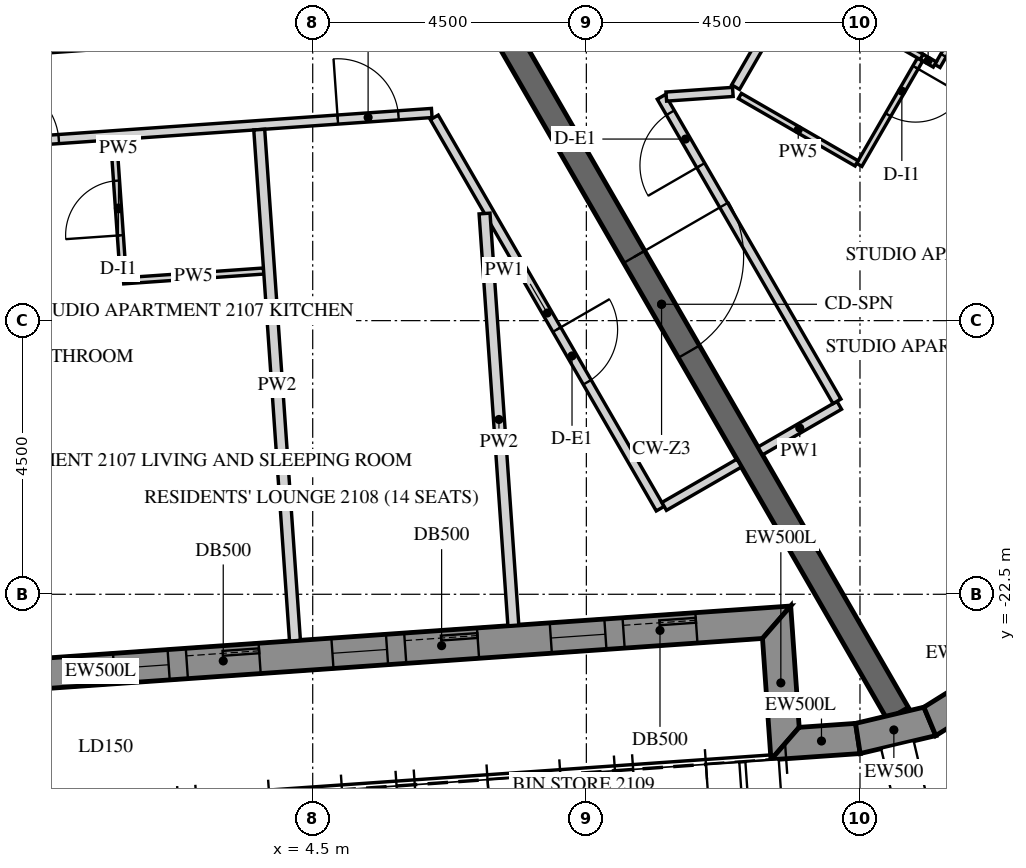
"""IFC4 building model, lengths in metres.
Left out: names, types, materials, properties, quantities, classifications, styles, units other than length and angle.
Written with IfcOpenShell. Run it as: python <this file> out.ifc"""

import sys

from ifc_helpers import new_model, si_unit, direction, frame, frame_2d, origin, place, context, subcontext, project, spatial, polyline, rectangle, outline, extrude, element, fill, save


model = new_model("IFC4")
c1 = context("Model", 3, precision=1e-05, world=origin(), true_north=direction((0.0, 1.0)))
c2 = subcontext(c1, "Body", "Model", "MODEL_VIEW")
j1 = project(units=[si_unit("LENGTHUNIT", "METRE"), si_unit("PLANEANGLEUNIT", "RADIAN")], contexts=[c1])
p1 = place(None, origin())
s1 = spatial("IfcSite", under=j1, at=p1, CompositionType="ELEMENT")
p2 = place(p1, origin())
s2 = spatial("IfcBuilding", under=s1, at=p2, CompositionType="ELEMENT")
p3 = place(p2, frame((0.0, 0.0, 267.9)))
s3 = spatial("IfcBuildingStorey", under=s2, at=p3, CompositionType="ELEMENT", Elevation=267.9)
p4 = place(p3, frame((-10.86, -24.567, -0.15), z_axis=(0.0, 0.0, 1.0), x_axis=(0.997564329317, 0.06975248292, 0.0)))
e1 = element("IfcWall", 1, at=p4, inside=s3, PredefinedType="SOLIDWALL", context=c2, shape_type="SweptSolid", body=[
    extrude(outline(polyline([(0.25, -0.25), (22.795, -0.25), (23.295, 0.25), (-0.25, 0.25), (0.25, -0.25)])), origin(), (0.0, 0.0, 1.0), 3.9),
])
p5 = place(p4, frame((1.323, 0.0, 1.05)))
e2 = element("IfcOpeningElement", 2, at=p5, cuts=e1, PredefinedType="OPENING", context=c2, shape_type="SweptSolid", body=[
    extrude(rectangle(XDim=0.9, YDim=1.5, at=frame_2d((0.45, 0.75))), frame((0.0, 0.26, 0.0), z_axis=(0.0, -1.0, 0.0), x_axis=(1.0, 0.0, 0.0)), (0.0, 0.0, 1.0), 0.52),
])
p6 = place(p4, frame((2.522, 0.0, 0.15)))
e3 = element("IfcOpeningElement", 3, at=p6, cuts=e1, PredefinedType="OPENING", context=c2, shape_type="SweptSolid", body=[
    extrude(rectangle(XDim=1.2, YDim=2.4, at=frame_2d((0.6, 1.2))), frame((0.0, 0.26, 0.0), z_axis=(0.0, -1.0, 0.0), x_axis=(1.0, 0.0, 0.0)), (0.0, 0.0, 1.0), 0.52),
])
p7 = place(p4, frame((4.922, 0.0, 1.05)))
e4 = element("IfcOpeningElement", 4, at=p7, cuts=e1, PredefinedType="OPENING", context=c2, shape_type="SweptSolid", body=[
    extrude(rectangle(XDim=0.9, YDim=1.5, at=frame_2d((0.45, 0.75))), frame((0.0, 0.26, 0.0), z_axis=(0.0, -1.0, 0.0), x_axis=(1.0, 0.0, 0.0)), (0.0, 0.0, 1.0), 0.52),
])
p8 = place(p4, frame((6.122, 0.0, 0.15)))
e5 = element("IfcOpeningElement", 5, at=p8, cuts=e1, PredefinedType="OPENING", context=c2, shape_type="SweptSolid", body=[
    extrude(rectangle(XDim=1.2, YDim=2.4, at=frame_2d((0.6, 1.2))), frame((0.0, 0.26, 0.0), z_axis=(0.0, -1.0, 0.0), x_axis=(1.0, 0.0, 0.0)), (0.0, 0.0, 1.0), 0.52),
])
p9 = place(p4, frame((8.522, 0.0, 1.05)))
e6 = element("IfcOpeningElement", 6, at=p9, cuts=e1, PredefinedType="OPENING", context=c2, shape_type="SweptSolid", body=[
    extrude(rectangle(XDim=0.9, YDim=1.5, at=frame_2d((0.45, 0.75))), frame((0.0, 0.26, 0.0), z_axis=(0.0, -1.0, 0.0), x_axis=(1.0, 0.0, 0.0)), (0.0, 0.0, 1.0), 0.52),
])
p10 = place(p4, frame((9.722, 0.0, 0.15)))
e7 = element("IfcOpeningElement", 7, at=p10, cuts=e1, PredefinedType="OPENING", context=c2, shape_type="SweptSolid", body=[
    extrude(rectangle(XDim=1.2, YDim=2.4, at=frame_2d((0.6, 1.2))), frame((0.0, 0.26, 0.0), z_axis=(0.0, -1.0, 0.0), x_axis=(1.0, 0.0, 0.0)), (0.0, 0.0, 1.0), 0.52),
])
p11 = place(p4, frame((12.122, 0.0, 1.05)))
e8 = element("IfcOpeningElement", 8, at=p11, cuts=e1, PredefinedType="OPENING", context=c2, shape_type="SweptSolid", body=[
    extrude(rectangle(XDim=0.9, YDim=1.5, at=frame_2d((0.45, 0.75))), frame((0.0, 0.26, 0.0), z_axis=(0.0, -1.0, 0.0), x_axis=(1.0, 0.0, 0.0)), (0.0, 0.0, 1.0), 0.52),
])
p12 = place(p4, frame((13.323, 0.0, 0.15)))
e9 = element("IfcOpeningElement", 9, at=p12, cuts=e1, PredefinedType="OPENING", context=c2, shape_type="SweptSolid", body=[
    extrude(rectangle(XDim=1.2, YDim=2.4, at=frame_2d((0.6, 1.2))), frame((0.0, 0.26, 0.0), z_axis=(0.0, -1.0, 0.0), x_axis=(1.0, 0.0, 0.0)), (0.0, 0.0, 1.0), 0.52),
])
p13 = place(p4, frame((15.722, 0.0, 1.05)))
e10 = element("IfcOpeningElement", 10, at=p13, cuts=e1, PredefinedType="OPENING", context=c2, shape_type="SweptSolid", body=[
    extrude(rectangle(XDim=0.9, YDim=1.5, at=frame_2d((0.45, 0.75))), frame((0.0, 0.26, 0.0), z_axis=(0.0, -1.0, 0.0), x_axis=(1.0, 0.0, 0.0)), (0.0, 0.0, 1.0), 0.52),
])
p14 = place(p4, frame((16.922, 0.0, 0.15)))
e11 = element("IfcOpeningElement", 11, at=p14, cuts=e1, PredefinedType="OPENING", context=c2, shape_type="SweptSolid", body=[
    extrude(rectangle(XDim=1.2, YDim=2.4, at=frame_2d((0.6, 1.2))), frame((0.0, 0.26, 0.0), z_axis=(0.0, -1.0, 0.0), x_axis=(1.0, 0.0, 0.0)), (0.0, 0.0, 1.0), 0.52),
])
p15 = place(p4, frame((19.323, 0.0, 1.05)))
e12 = element("IfcOpeningElement", 12, at=p15, cuts=e1, PredefinedType="OPENING", context=c2, shape_type="SweptSolid", body=[
    extrude(rectangle(XDim=0.9, YDim=1.5, at=frame_2d((0.45, 0.75))), frame((0.0, 0.26, 0.0), z_axis=(0.0, -1.0, 0.0), x_axis=(1.0, 0.0, 0.0)), (0.0, 0.0, 1.0), 0.52),
])
p16 = place(p4, frame((20.522, 0.0, 0.15)))
e13 = element("IfcOpeningElement", 13, at=p16, cuts=e1, PredefinedType="OPENING", context=c2, shape_type="SweptSolid", body=[
    extrude(rectangle(XDim=1.2, YDim=2.4, at=frame_2d((0.6, 1.2))), frame((0.0, 0.26, 0.0), z_axis=(0.0, -1.0, 0.0), x_axis=(1.0, 0.0, 0.0)), (0.0, 0.0, 1.0), 0.52),
])
p17 = place(p3, frame((12.129, -22.96, -0.15), z_axis=(0.0, 0.0, 1.0), x_axis=(0.069824268692, -0.99755930726, 0.0)))
e14 = element("IfcWall", 14, at=p17, inside=s3, PredefinedType="SOLIDWALL", context=c2, shape_type="SweptSolid", body=[
    extrude(outline(polyline([(0.25, -0.25), (2.25, -0.25), (1.75, 0.25), (-0.25, 0.25), (0.25, -0.25)])), origin(), (0.0, 0.0, 1.0), 3.9),
])
p18 = place(p3, frame((12.268, -24.955, -0.15), z_axis=(0.0, 0.0, 1.0), x_axis=(0.997561942506, 0.06978660948, 0.0)))
e15 = element("IfcWall", 15, at=p18, inside=s3, PredefinedType="SOLIDWALL", context=c2, shape_type="SweptSolid", body=[
    extrude(outline(polyline([(-0.25, -0.25), (1.22, -0.25), (1.179, 0.25), (0.25, 0.25), (-0.25, -0.25)])), origin(), (0.0, 0.0, 1.0), 3.9),
])
p19 = place(p3, frame((13.465, -24.871, -0.15), z_axis=(0.0, 0.0, 1.0), x_axis=(0.973044740285, 0.230616420501, 0.0)))
e16 = element("IfcWall", 16, at=p19, inside=s3, PredefinedType="SOLIDWALL", context=c2, shape_type="SweptSolid", body=[
    extrude(outline(polyline([(-0.021, -0.25), (1.257, -0.25), (1.175, 0.25), (0.021, 0.25), (-0.021, -0.25)])), origin(), (0.0, 0.0, 1.0), 3.9),
])
p20 = place(p3, frame((14.649, -24.591, -0.15), z_axis=(0.0, 0.0, 1.0), x_axis=(0.848054682072, 0.529908724419, 0.0)))
e17 = element("IfcWall", 17, at=p20, inside=s3, PredefinedType="SOLIDWALL", context=c2, shape_type="SweptSolid", body=[
    extrude(outline(polyline([(-0.041, -0.25), (1.257, -0.25), (1.175, 0.25), (0.041, 0.25), (-0.041, -0.25)])), origin(), (0.0, 0.0, 1.0), 3.9),
])
p21 = place(p3, frame((6.351, -11.0, -0.15), z_axis=(0.0, 0.0, 1.0), x_axis=(0.499998894578, -0.866026041999, 0.0)))
e18 = element("IfcWall", 18, at=p21, inside=s3, PredefinedType="SHEAR", context=c2, shape_type="SweptSolid", body=[
    extrude(rectangle(XDim=15.544, YDim=0.4, at=frame_2d((7.772, 0.0))), origin(), (0.0, 0.0, 1.0), 3.9),
])
p22 = place(p21, frame((6.872, 0.0, 0.15)))
e19 = element("IfcOpeningElement", 19, at=p22, cuts=e18, PredefinedType="OPENING", context=c2, shape_type="SweptSolid", body=[
    extrude(rectangle(XDim=1.8, YDim=2.4, at=frame_2d((0.9, 1.2))), frame((0.0, 0.21, 0.0), z_axis=(0.0, -1.0, 0.0), x_axis=(1.0, 0.0, 0.0)), (0.0, 0.0, 1.0), 0.42),
])
p23 = place(p3, frame((-10.44, -15.767, 0.0), z_axis=(0.0, 0.0, 1.0), x_axis=(0.997565037323, 0.069742356651, 0.0)))
e20 = element("IfcWall", 20, at=p23, inside=s3, PredefinedType="PARTITIONING", context=c2, shape_type="SweptSolid", body=[
    extrude(rectangle(XDim=16.939, YDim=0.15, at=frame_2d((8.47, 0.0))), origin(), (0.0, 0.0, 1.0), 2.988),
])
p24 = place(p23, frame((9.79, 0.0, 0.0)))
e21 = element("IfcOpeningElement", 21, at=p24, cuts=e20, PredefinedType="OPENING", context=c2, shape_type="SweptSolid", body=[
    extrude(rectangle(XDim=1.0, YDim=2.1, at=frame_2d((0.5, 1.05))), frame((0.0, 0.085, 0.0), z_axis=(0.0, -1.0, 0.0), x_axis=(1.0, 0.0, 0.0)), (0.0, 0.0, 1.0), 0.17),
])
p25 = place(p23, frame((15.39, 0.0, 0.0)))
e22 = element("IfcOpeningElement", 22, at=p25, cuts=e20, PredefinedType="OPENING", context=c2, shape_type="SweptSolid", body=[
    extrude(rectangle(XDim=1.0, YDim=2.1, at=frame_2d((0.5, 1.05))), frame((0.0, 0.085, 0.0), z_axis=(0.0, -1.0, 0.0), x_axis=(1.0, 0.0, 0.0)), (0.0, 0.0, 1.0), 0.17),
])
p26 = place(p3, frame((6.5, -14.657, 0.0), z_axis=(0.0, 0.0, 1.0), x_axis=(0.499966098742, -0.8660449758, 0.0)))
e23 = element("IfcWall", 23, at=p26, inside=s3, PredefinedType="PARTITIONING", context=c2, shape_type="SweptSolid", body=[
    extrude(rectangle(XDim=7.431, YDim=0.15, at=frame_2d((3.715, 0.0))), origin(), (0.0, 0.0, 1.0), 2.988),
])
p27 = place(p26, frame((4.03, 0.0, 0.0)))
e24 = element("IfcOpeningElement", 24, at=p27, cuts=e23, PredefinedType="OPENING", context=c2, shape_type="SweptSolid", body=[
    extrude(rectangle(XDim=1.0, YDim=2.1, at=frame_2d((0.5, 1.05))), frame((0.0, 0.085, 0.0), z_axis=(0.0, -1.0, 0.0), x_axis=(1.0, 0.0, 0.0)), (0.0, 0.0, 1.0), 0.17),
])
p28 = place(p3, frame((10.28, -21.055, 0.0), z_axis=(0.0, 0.0, 1.0), x_axis=(0.866020080793, 0.500009219579, 0.0)))
e25 = element("IfcWall", 25, at=p28, inside=s3, PredefinedType="PARTITIONING", context=c2, shape_type="SweptSolid", body=[
    extrude(rectangle(XDim=1.425, YDim=0.15, at=frame_2d((0.712, 0.0))), origin(), (0.0, 0.0, 1.0), 2.988),
])
p29 = place(p3, frame((6.884, -13.052, 0.0), z_axis=(0.0, 0.0, 1.0), x_axis=(-0.997564224443, -0.069753982764, 0.0)))
e26 = element("IfcWall", 26, at=p29, inside=s3, PredefinedType="PARTITIONING", context=c2, shape_type="SweptSolid", body=[
    extrude(rectangle(XDim=16.618, YDim=0.15, at=frame_2d((8.309, 0.0))), origin(), (0.0, 0.0, 1.0), 2.988),
])
p30 = place(p29, frame((7.859, 0.0, 0.0)))
e27 = element("IfcOpeningElement", 27, at=p30, cuts=e26, PredefinedType="OPENING", context=c2, shape_type="SweptSolid", body=[
    extrude(rectangle(XDim=0.9, YDim=2.1, at=frame_2d((0.45, 1.05))), frame((0.0, 0.085, 0.0), z_axis=(0.0, -1.0, 0.0), x_axis=(1.0, 0.0, 0.0)), (0.0, 0.0, 1.0), 0.17),
])
p31 = place(p3, frame((11.86, -20.142, 0.0), z_axis=(0.0, 0.0, 1.0), x_axis=(0.866031096941, 0.499990139034, 0.0)))
e28 = element("IfcWall", 28, at=p31, inside=s3, PredefinedType="PARTITIONING", context=c2, shape_type="SweptSolid", body=[
    extrude(rectangle(XDim=1.5, YDim=0.15, at=frame_2d((0.75, 0.0))), origin(), (0.0, 0.0, 1.0), 2.988),
])
p32 = place(p3, frame((13.122, -19.327, 0.0), z_axis=(0.0, 0.0, 1.0), x_axis=(-0.500013707032, 0.866017489881, 0.0)))
e29 = element("IfcWall", 29, at=p32, inside=s3, PredefinedType="PARTITIONING", context=c2, shape_type="SweptSolid", body=[
    extrude(rectangle(XDim=5.781, YDim=0.15, at=frame_2d((2.89, 0.0))), origin(), (0.0, 0.0, 1.0), 2.988),
])
p33 = place(p32, frame((4.481, 0.0, 0.0)))
e30 = element("IfcOpeningElement", 30, at=p33, cuts=e29, PredefinedType="OPENING", context=c2, shape_type="SweptSolid", body=[
    extrude(rectangle(XDim=1.0, YDim=2.1, at=frame_2d((0.5, 1.05))), frame((0.0, 0.085, 0.0), z_axis=(0.0, -1.0, 0.0), x_axis=(1.0, 0.0, 0.0)), (0.0, 0.0, 1.0), 0.17),
])
p34 = place(p3, frame((10.314, -14.315, 0.0), z_axis=(0.0, 0.0, 1.0), x_axis=(0.997557107149, 0.069855693944, 0.0)))
e31 = element("IfcWall", 31, at=p34, inside=s3, PredefinedType="PARTITIONING", context=c2, shape_type="SweptSolid", body=[
    extrude(rectangle(XDim=1.097, YDim=0.15, at=frame_2d((0.549, 0.0))), origin(), (0.0, 0.0, 1.0), 2.988),
])
p35 = place(p3, frame((11.454, -14.16, 0.0), z_axis=(0.0, 0.0, 1.0), x_axis=(0.500000296604, 0.86602523254, 0.0)))
e32 = element("IfcWall", 32, at=p35, inside=s3, PredefinedType="PARTITIONING", context=c2, shape_type="SweptSolid", body=[
    extrude(rectangle(XDim=14.934, YDim=0.15, at=frame_2d((7.467, 0.0))), origin(), (0.0, 0.0, 1.0), 2.988),
])
p36 = place(p35, frame((7.261, 0.0, 0.0)))
e33 = element("IfcOpeningElement", 33, at=p36, cuts=e32, PredefinedType="OPENING", context=c2, shape_type="SweptSolid", body=[
    extrude(rectangle(XDim=1.0, YDim=2.1, at=frame_2d((0.5, 1.05))), frame((0.0, 0.085, 0.0), z_axis=(0.0, -1.0, 0.0), x_axis=(1.0, 0.0, 0.0)), (0.0, 0.0, 1.0), 0.17),
])
p37 = place(p35, frame((13.784, 0.0, 0.0)))
e34 = element("IfcOpeningElement", 34, at=p37, cuts=e32, PredefinedType="OPENING", context=c2, shape_type="SweptSolid", body=[
    extrude(rectangle(XDim=1.0, YDim=2.1, at=frame_2d((0.5, 1.05))), frame((0.0, 0.085, 0.0), z_axis=(0.0, -1.0, 0.0), x_axis=(1.0, 0.0, 0.0)), (0.0, 0.0, 1.0), 0.17),
])
p38 = place(p3, frame((3.693, -17.184, 0.0), z_axis=(0.0, 0.0, 1.0), x_axis=(-0.997563824095, -0.069759707979, 0.0)))
e35 = element("IfcWall", 35, at=p38, inside=s3, PredefinedType="PARTITIONING", context=c2, shape_type="SweptSolid", body=[
    extrude(rectangle(XDim=2.31, YDim=0.1, at=frame_2d((1.155, 0.0))), origin(), (0.0, 0.0, 1.0), 2.988),
])
p39 = place(p3, frame((1.385, -17.295, 0.0), z_axis=(0.0, 0.0, 1.0), x_axis=(-0.069759707979, 0.997563824095, 0.0)))
e36 = element("IfcWall", 36, at=p39, inside=s3, PredefinedType="PARTITIONING", context=c2, shape_type="SweptSolid", body=[
    extrude(rectangle(XDim=2.275, YDim=0.1, at=frame_2d((1.137, 0.0))), origin(), (0.0, 0.0, 1.0), 2.988),
])
p40 = place(p39, frame((0.7, 0.0, 0.0)))
e37 = element("IfcOpeningElement", 37, at=p40, cuts=e36, PredefinedType="OPENING", context=c2, shape_type="SweptSolid", body=[
    extrude(rectangle(XDim=0.9, YDim=2.1, at=frame_2d((0.45, 1.05))), frame((0.0, 0.06, 0.0), z_axis=(0.0, -1.0, 0.0), x_axis=(1.0, 0.0, 0.0)), (0.0, 0.0, 1.0), 0.12),
])
p41 = place(p3, frame((4.208, -23.263, 0.0), z_axis=(0.0, 0.0, 1.0), x_axis=(-0.069749826803, 0.997564515037, 0.0)))
e38 = element("IfcWall", 38, at=p41, inside=s3, PredefinedType="PARTITIONING", context=c2, shape_type="SweptSolid", body=[
    extrude(rectangle(XDim=8.425, YDim=0.18, at=frame_2d((4.212, 0.0))), origin(), (0.0, 0.0, 1.0), 2.988),
])
p42 = place(p3, frame((7.8, -23.012, 0.0), z_axis=(0.0, 0.0, 1.0), x_axis=(-0.069757205717, 0.997563999075, 0.0)))
e39 = element("IfcWall", 39, at=p42, inside=s3, PredefinedType="PARTITIONING", context=c2, shape_type="SweptSolid", body=[
    extrude(rectangle(XDim=6.79, YDim=0.18, at=frame_2d((3.395, 0.0))), origin(), (0.0, 0.0, 1.0), 2.988),
])
p43 = place(p3, frame((15.728, -12.158, 0.0), z_axis=(0.0, 0.0, 1.0), x_axis=(-0.499947453424, -0.866055739439, 0.0)))
e40 = element("IfcWall", 40, at=p43, inside=s3, PredefinedType="PARTITIONING", context=c2, shape_type="SweptSolid", body=[
    extrude(rectangle(XDim=1.91, YDim=0.1, at=frame_2d((0.955, 0.0))), origin(), (0.0, 0.0, 1.0), 2.988),
])
p44 = place(p43, frame((0.91, 0.0, 0.0)))
e41 = element("IfcOpeningElement", 41, at=p44, cuts=e40, PredefinedType="OPENING", context=c2, shape_type="SweptSolid", body=[
    extrude(rectangle(XDim=0.8, YDim=2.1, at=frame_2d((0.4, 1.05))), frame((0.0, 0.06, 0.0), z_axis=(0.0, -1.0, 0.0), x_axis=(1.0, 0.0, 0.0)), (0.0, 0.0, 1.0), 0.12),
])
p45 = place(p3, frame((14.73, -13.787, 0.0), z_axis=(0.0, 0.0, 1.0), x_axis=(-0.865669265636, 0.500616342655, 0.0)))
e42 = element("IfcWall", 42, at=p45, inside=s3, PredefinedType="PARTITIONING", context=c2, shape_type="SweptSolid", body=[
    extrude(rectangle(XDim=0.252, YDim=0.1, at=frame_2d((0.126, 0.0))), origin(), (0.0, 0.0, 1.0), 2.988),
])
p46 = place(p3, frame((14.488, -13.706, 0.0), z_axis=(0.0, 0.0, 1.0), x_axis=(-0.500035721725, -0.866004778855, 0.0)))
e43 = element("IfcWall", 43, at=p46, inside=s3, PredefinedType="PARTITIONING", context=c2, shape_type="SweptSolid", body=[
    extrude(rectangle(XDim=2.001, YDim=0.1, at=frame_2d((1.0, 0.0))), origin(), (0.0, 0.0, 1.0), 2.988),
])
p47 = place(p46, frame((0.15, 0.0, 0.0)))
e44 = element("IfcOpeningElement", 44, at=p47, cuts=e43, PredefinedType="OPENING", context=c2, shape_type="SweptSolid", body=[
    extrude(rectangle(XDim=0.9, YDim=2.1, at=frame_2d((0.45, 1.05))), frame((0.0, 0.06, 0.0), z_axis=(0.0, -1.0, 0.0), x_axis=(1.0, 0.0, 0.0)), (0.0, 0.0, 1.0), 0.12),
])
p48 = place(p3, frame((13.444, -15.414, 0.0), z_axis=(0.0, 0.0, 1.0), x_axis=(-0.866024121142, 0.500002221596, 0.0)))
e45 = element("IfcWall", 45, at=p48, inside=s3, PredefinedType="PARTITIONING", context=c2, shape_type="SweptSolid", body=[
    extrude(rectangle(XDim=2.216, YDim=0.1, at=frame_2d((1.108, 0.0))), origin(), (0.0, 0.0, 1.0), 2.988),
])
p49 = place(p3, frame((20.796, -14.98, 0.0), z_axis=(0.0, 0.0, 1.0), x_axis=(-0.866021515814, 0.500006734102, 0.0)))
e46 = element("IfcWall", 46, at=p49, inside=s3, PredefinedType="PARTITIONING", context=c2, shape_type="SweptSolid", body=[
    extrude(rectangle(XDim=8.425, YDim=0.18, at=frame_2d((4.213, 0.0))), origin(), (0.0, 0.0, 1.0), 2.988),
])
p50 = place(p3, frame((12.5, -12.5, 0.0), z_axis=(0.0, 0.0, 1.0), x_axis=(0.865998469481, -0.500046648681, 0.0)))
e47 = element("IfcWall", 47, at=p50, inside=s3, PredefinedType="PARTITIONING", context=c2, shape_type="SweptSolid", body=[
    extrude(rectangle(XDim=2.325, YDim=0.1, at=frame_2d((1.163, 0.0))), origin(), (0.0, 0.0, 1.0), 2.988),
])
p51 = place(p11, frame((0.0, 0.18, 0.0)))
e48 = element("IfcWindow", 48, at=p51, inside=s3, PartitioningType="SINGLE_PANEL", PredefinedType="WINDOW", context=c2, shape_type="SweptSolid", body=[
    extrude(rectangle(XDim=0.9, YDim=1.5, at=frame_2d((0.45, 0.75))), frame((0.0, 0.03, 0.0), z_axis=(0.0, -1.0, 0.0), x_axis=(1.0, 0.0, 0.0)), (0.0, 0.0, 1.0), 0.06),
])
fill(e8, e48)
p52 = place(p12, frame((0.0, 0.175, 0.0)))
e49 = element("IfcDoor", 49, at=p52, inside=s3, OperationType="SLIDING_TO_LEFT", PredefinedType="DOOR", context=c2, shape_type="SweptSolid", body=[
    extrude(rectangle(XDim=1.2, YDim=2.4, at=frame_2d((0.6, 1.2))), frame((0.0, 0.025, 0.0), z_axis=(0.0, -1.0, 0.0), x_axis=(1.0, 0.0, 0.0)), (0.0, 0.0, 1.0), 0.05),
])
fill(e9, e49)
p53 = place(p13, frame((0.0, 0.18, 0.0)))
e50 = element("IfcWindow", 50, at=p53, inside=s3, PartitioningType="SINGLE_PANEL", PredefinedType="WINDOW", context=c2, shape_type="SweptSolid", body=[
    extrude(rectangle(XDim=0.9, YDim=1.5, at=frame_2d((0.45, 0.75))), frame((0.0, 0.03, 0.0), z_axis=(0.0, -1.0, 0.0), x_axis=(1.0, 0.0, 0.0)), (0.0, 0.0, 1.0), 0.06),
])
fill(e10, e50)
p54 = place(p14, frame((0.0, 0.175, 0.0)))
e51 = element("IfcDoor", 51, at=p54, inside=s3, OperationType="SLIDING_TO_LEFT", PredefinedType="DOOR", context=c2, shape_type="SweptSolid", body=[
    extrude(rectangle(XDim=1.2, YDim=2.4, at=frame_2d((0.6, 1.2))), frame((0.0, 0.025, 0.0), z_axis=(0.0, -1.0, 0.0), x_axis=(1.0, 0.0, 0.0)), (0.0, 0.0, 1.0), 0.05),
])
fill(e11, e51)
p55 = place(p15, frame((0.0, 0.18, 0.0)))
e52 = element("IfcWindow", 52, at=p55, inside=s3, PartitioningType="SINGLE_PANEL", PredefinedType="WINDOW", context=c2, shape_type="SweptSolid", body=[
    extrude(rectangle(XDim=0.9, YDim=1.5, at=frame_2d((0.45, 0.75))), frame((0.0, 0.03, 0.0), z_axis=(0.0, -1.0, 0.0), x_axis=(1.0, 0.0, 0.0)), (0.0, 0.0, 1.0), 0.06),
])
fill(e12, e52)
p56 = place(p16, frame((0.0, 0.175, 0.0)))
e53 = element("IfcDoor", 53, at=p56, inside=s3, OperationType="SLIDING_TO_LEFT", PredefinedType="DOOR", context=c2, shape_type="SweptSolid", body=[
    extrude(rectangle(XDim=1.2, YDim=2.4, at=frame_2d((0.6, 1.2))), frame((0.0, 0.025, 0.0), z_axis=(0.0, -1.0, 0.0), x_axis=(1.0, 0.0, 0.0)), (0.0, 0.0, 1.0), 0.05),
])
fill(e13, e53)
p57 = place(p22, origin())
e54 = element("IfcDoor", 54, at=p57, inside=s3, OperationType="DOUBLE_DOOR_SINGLE_SWING", PredefinedType="DOOR", context=c2, shape_type="SweptSolid", body=[
    extrude(rectangle(XDim=1.8, YDim=2.4, at=frame_2d((0.9, 1.2))), frame((0.0, 0.025, 0.0), z_axis=(0.0, -1.0, 0.0), x_axis=(1.0, 0.0, 0.0)), (0.0, 0.0, 1.0), 0.05),
])
fill(e19, e54)
p58 = place(p24, origin())
e55 = element("IfcDoor", 55, at=p58, inside=s3, OperationType="SINGLE_SWING_RIGHT", PredefinedType="DOOR", context=c2, shape_type="SweptSolid", body=[
    extrude(rectangle(XDim=1.0, YDim=2.1, at=frame_2d((0.5, 1.05))), frame((0.0, 0.025, 0.0), z_axis=(0.0, -1.0, 0.0), x_axis=(1.0, 0.0, 0.0)), (0.0, 0.0, 1.0), 0.05),
])
fill(e21, e55)
p59 = place(p40, origin())
e56 = element("IfcDoor", 56, at=p59, inside=s3, OperationType="SINGLE_SWING_RIGHT", PredefinedType="DOOR", context=c2, shape_type="SweptSolid", body=[
    extrude(rectangle(XDim=0.9, YDim=2.1, at=frame_2d((0.45, 1.05))), frame((0.0, 0.025, 0.0), z_axis=(0.0, -1.0, 0.0), x_axis=(1.0, 0.0, 0.0)), (0.0, 0.0, 1.0), 0.05),
])
fill(e37, e56)
p60 = place(p25, origin())
e57 = element("IfcDoor", 57, at=p60, inside=s3, OperationType="SINGLE_SWING_LEFT", PredefinedType="DOOR", context=c2, shape_type="SweptSolid", body=[
    extrude(rectangle(XDim=1.0, YDim=2.1, at=frame_2d((0.5, 1.05))), frame((0.0, 0.025, 0.0), z_axis=(0.0, -1.0, 0.0), x_axis=(1.0, 0.0, 0.0)), (0.0, 0.0, 1.0), 0.05),
])
fill(e22, e57)
p61 = place(p27, origin())
e58 = element("IfcDoor", 58, at=p61, inside=s3, OperationType="SINGLE_SWING_RIGHT", PredefinedType="DOOR", context=c2, shape_type="SweptSolid", body=[
    extrude(rectangle(XDim=1.0, YDim=2.1, at=frame_2d((0.5, 1.05))), frame((0.0, 0.025, 0.0), z_axis=(0.0, -1.0, 0.0), x_axis=(1.0, 0.0, 0.0)), (0.0, 0.0, 1.0), 0.05),
])
fill(e24, e58)
p62 = place(p33, origin())
e59 = element("IfcDoor", 59, at=p62, inside=s3, OperationType="SINGLE_SWING_LEFT", PredefinedType="DOOR", context=c2, shape_type="SweptSolid", body=[
    extrude(rectangle(XDim=1.0, YDim=2.1, at=frame_2d((0.5, 1.05))), frame((0.0, 0.025, 0.0), z_axis=(0.0, -1.0, 0.0), x_axis=(1.0, 0.0, 0.0)), (0.0, 0.0, 1.0), 0.05),
])
fill(e30, e59)
p63 = place(p44, origin())
e60 = element("IfcDoor", 60, at=p63, inside=s3, OperationType="SINGLE_SWING_LEFT", PredefinedType="DOOR", context=c2, shape_type="SweptSolid", body=[
    extrude(rectangle(XDim=0.8, YDim=2.1, at=frame_2d((0.4, 1.05))), frame((0.0, 0.025, 0.0), z_axis=(0.0, -1.0, 0.0), x_axis=(1.0, 0.0, 0.0)), (0.0, 0.0, 1.0), 0.05),
])
fill(e41, e60)
p64 = place(p47, origin())
e61 = element("IfcDoor", 61, at=p64, inside=s3, OperationType="SINGLE_SWING_RIGHT", PredefinedType="DOOR", context=c2, shape_type="SweptSolid", body=[
    extrude(rectangle(XDim=0.9, YDim=2.1, at=frame_2d((0.45, 1.05))), frame((0.0, 0.025, 0.0), z_axis=(0.0, -1.0, 0.0), x_axis=(1.0, 0.0, 0.0)), (0.0, 0.0, 1.0), 0.05),
])
fill(e44, e61)
save(model, sys.argv[1])
